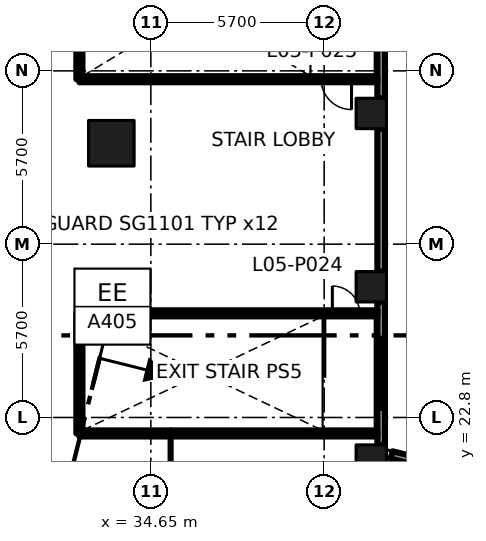
"""IFC4 building model, lengths in metres.
Left out: names, types, materials, properties, quantities, classifications, styles, units other than length and angle.
Written with IfcOpenShell. Run it as: python <this file> out.ifc"""

import sys

from ifc_helpers import new_model, si_unit, direction, frame, frame_2d, origin, origin_2d, place, context, subcontext, project, spatial, rectangle, extrude, element, fill, save


model = new_model("IFC4")
c1 = context("Model", 3, precision=1e-05, world=origin(), true_north=direction((0.0, 1.0)))
c2 = subcontext(c1, "Body", "Model", "MODEL_VIEW")
j1 = project(units=[si_unit("LENGTHUNIT", "METRE"), si_unit("PLANEANGLEUNIT", "RADIAN")], contexts=[c1])
p1 = place(None, origin())
s1 = spatial("IfcSite", under=j1, at=p1, CompositionType="ELEMENT")
p2 = place(p1, origin())
s2 = spatial("IfcBuilding", under=s1, at=p2, CompositionType="ELEMENT")
p3 = place(p2, frame((0.0, 0.0, 28.2)))
s3 = spatial("IfcBuildingStorey", under=s2, at=p3, CompositionType="ELEMENT", Elevation=28.2)
for number, where, z_axis, x_axis in (
    (1, (33.35, 26.119, 0.0), (0.0, 0.0, 1.0), (1.0, 0.0, 0.0)),
    (2, (33.35, 31.819, 0.0), (0.0, 0.0, 1.0), (1.0, 0.0, 0.0)),
):
    element("IfcColumn", number, at=place(p3, frame(where, z_axis=z_axis, x_axis=x_axis)), inside=s3, PredefinedType="COLUMN", context=c2, shape_type="SweptSolid", body=[
        extrude(rectangle(XDim=1.5, YDim=1.5, at=origin_2d()), origin(), (0.0, 0.0, 1.0), 4.8),
    ])
for number, where, z_axis, x_axis in (
    (3, (41.9, 21.399, 0.0), (0.0, 0.0, 1.0), (1.0, 0.0, 0.0)),
    (4, (41.9, 27.099, 0.0), (0.0, 0.0, 1.0), (1.0, 0.0, 0.0)),
    (5, (41.9, 32.799, 0.0), (0.0, 0.0, 1.0), (1.0, 0.0, 0.0)),
):
    element("IfcColumn", number, at=place(p3, frame(where, z_axis=z_axis, x_axis=x_axis)), inside=s3, PredefinedType="COLUMN", context=c2, shape_type="SweptSolid", body=[
        extrude(rectangle(XDim=1.0, YDim=1.0, at=origin_2d()), origin(), (0.0, 0.0, 1.0), 4.8),
    ])
p4 = place(p3, frame((32.3, 22.275, 0.0), z_axis=(0.0, 0.0, 1.0), x_axis=(0.0, 1.0, 0.0)))
e6 = element("IfcWall", 6, at=p4, inside=s3, PredefinedType="SOLIDWALL", context=c2, shape_type="SweptSolid", body=[
    extrude(rectangle(XDim=3.95, YDim=0.2, at=frame_2d((1.975, 0.0))), origin(), (0.0, 0.0, 1.0), 4.35),
])
p5 = place(p3, frame((32.3, 33.925, 0.0), z_axis=(0.0, 0.0, 1.0), x_axis=(0.0, 1.0, 0.0)))
e7 = element("IfcWall", 7, at=p5, inside=s3, PredefinedType="SOLIDWALL", context=c2, shape_type="SweptSolid", body=[
    extrude(rectangle(XDim=4.75, YDim=0.2, at=frame_2d((2.375, 0.0))), origin(), (0.0, 0.0, 1.0), 4.35),
])
p6 = place(p3, frame((34.12, 26.225, 0.0), z_axis=(0.0, 0.0, 1.0), x_axis=(1.0, 0.0, 0.0)))
e8 = element("IfcWall", 8, at=p6, inside=s3, PredefinedType="SOLIDWALL", context=c2, shape_type="SweptSolid", body=[
    extrude(rectangle(XDim=7.98, YDim=0.2, at=frame_2d((3.99, 0.0))), origin(), (0.0, 0.0, 1.0), 4.35),
])
p7 = place(p6, frame((6.5, 0.0, 0.0)))
e9 = element("IfcOpeningElement", 9, at=p7, cuts=e8, PredefinedType="OPENING", context=c2, shape_type="SweptSolid", body=[
    extrude(rectangle(XDim=0.9, YDim=2.1, at=frame_2d((0.45, 1.05))), frame((0.0, 0.11, 0.0), z_axis=(0.0, -1.0, 0.0), x_axis=(1.0, 0.0, 0.0)), (0.0, 0.0, 1.0), 0.22),
])
p8 = place(p3, frame((35.3, 9.6, 0.0), z_axis=(0.0, 0.0, 1.0), x_axis=(0.0, 1.0, 0.0)))
e10 = element("IfcWall", 10, at=p8, inside=s3, PredefinedType="PARTITIONING", context=c2, shape_type="SweptSolid", body=[
    extrude(rectangle(XDim=12.675, YDim=0.1, at=frame_2d((6.337, 0.0))), origin(), (0.0, 0.0, 1.0), 4.35),
])
p9 = place(p8, frame((1.68, 0.0, 0.0)))
e11 = element("IfcOpeningElement", 11, at=p9, cuts=e10, PredefinedType="OPENING", context=c2, shape_type="SweptSolid", body=[
    extrude(rectangle(XDim=1.8, YDim=2.1, at=frame_2d((0.9, 1.05))), frame((0.0, 0.06, 0.0), z_axis=(0.0, -1.0, 0.0), x_axis=(1.0, 0.0, 0.0)), (0.0, 0.0, 1.0), 0.12),
])
p10 = place(p8, frame((8.18, 0.0, 0.0)))
e12 = element("IfcOpeningElement", 12, at=p10, cuts=e10, PredefinedType="OPENING", context=c2, shape_type="SweptSolid", body=[
    extrude(rectangle(XDim=1.0, YDim=2.1, at=frame_2d((0.5, 1.05))), frame((0.0, 0.06, 0.0), z_axis=(0.0, -1.0, 0.0), x_axis=(1.0, 0.0, 0.0)), (0.0, 0.0, 1.0), 0.12),
])
p11 = place(p3, frame((35.3, 22.275, 0.0), z_axis=(0.0, 0.0, 1.0), x_axis=(-1.0, 0.0, 0.0)))
e13 = element("IfcWall", 13, at=p11, inside=s3, PredefinedType="SOLIDWALL", context=c2, shape_type="SweptSolid", body=[
    extrude(rectangle(XDim=3.0, YDim=0.2, at=frame_2d((1.5, 0.0))), origin(), (0.0, 0.0, 1.0), 4.35),
])
p12 = place(p3, frame((42.1, 33.925, 0.0), z_axis=(0.0, 0.0, 1.0), x_axis=(-1.0, 0.0, 0.0)))
e14 = element("IfcWall", 14, at=p12, inside=s3, PredefinedType="SOLIDWALL", context=c2, shape_type="SweptSolid", body=[
    extrude(rectangle(XDim=9.8, YDim=0.2, at=frame_2d((4.9, 0.0))), origin(), (0.0, 0.0, 1.0), 4.35),
])
p13 = place(p12, frame((0.85, 0.0, 0.0)))
e15 = element("IfcOpeningElement", 15, at=p13, cuts=e14, PredefinedType="OPENING", context=c2, shape_type="SweptSolid", body=[
    extrude(rectangle(XDim=1.0, YDim=2.1, at=frame_2d((0.5, 1.05))), frame((0.0, 0.11, 0.0), z_axis=(0.0, -1.0, 0.0), x_axis=(1.0, 0.0, 0.0)), (0.0, 0.0, 1.0), 0.22),
])
p14 = place(p3, frame((35.3, 22.275, 0.0), z_axis=(0.0, 0.0, 1.0), x_axis=(1.0, 0.0, 0.0)))
e16 = element("IfcWall", 16, at=p14, inside=s3, PredefinedType="SOLIDWALL", context=c2, shape_type="SweptSolid", body=[
    extrude(rectangle(XDim=6.8, YDim=0.2, at=frame_2d((3.4, 0.0))), origin(), (0.0, 0.0, 1.0), 4.35),
])
p15 = place(p3, frame((46.922, 20.482, 0.0), z_axis=(0.0, 0.0, 1.0), x_axis=(-0.970279921141, 0.241985277715, 0.0)))
e17 = element("IfcWall", 17, at=p15, inside=s3, PredefinedType="SOLIDWALL", context=c2, shape_type="SweptSolid", body=[
    extrude(rectangle(XDim=4.489, YDim=0.25, at=frame_2d((2.244, 0.0))), origin(), (0.0, 0.0, 1.0), 3.45),
])
p16 = place(p15, frame((1.397, 0.0, 0.9)))
e18 = element("IfcOpeningElement", 18, at=p16, cuts=e17, PredefinedType="OPENING", context=c2, shape_type="SweptSolid", body=[
    extrude(rectangle(XDim=2.4, YDim=2.1, at=frame_2d((1.2, 1.05))), frame((0.0, 0.135, 0.0), z_axis=(0.0, -1.0, 0.0), x_axis=(1.0, 0.0, 0.0)), (0.0, 0.0, 1.0), 0.27),
])
p17 = place(p3, frame((42.225, 21.899, 0.0), z_axis=(0.0, 0.0, 1.0), x_axis=(0.0, 1.0, 0.0)))
e19 = element("IfcWall", 19, at=p17, inside=s3, PredefinedType="SOLIDWALL", context=c2, shape_type="SweptSolid", body=[
    extrude(rectangle(XDim=4.7, YDim=0.25, at=frame_2d((2.35, 0.0))), origin(), (0.0, 0.0, 1.0), 3.45),
])
p18 = place(p17, frame((1.15, 0.0, 0.9)))
e20 = element("IfcOpeningElement", 20, at=p18, cuts=e19, PredefinedType="OPENING", context=c2, shape_type="SweptSolid", body=[
    extrude(rectangle(XDim=2.4, YDim=2.1, at=frame_2d((1.2, 1.05))), frame((0.0, 0.135, 0.0), z_axis=(0.0, -1.0, 0.0), x_axis=(1.0, 0.0, 0.0)), (0.0, 0.0, 1.0), 0.27),
])
p19 = place(p3, frame((42.225, 27.599, 0.0), z_axis=(0.0, 0.0, 1.0), x_axis=(0.0, 1.0, 0.0)))
e21 = element("IfcWall", 21, at=p19, inside=s3, PredefinedType="SOLIDWALL", context=c2, shape_type="SweptSolid", body=[
    extrude(rectangle(XDim=4.7, YDim=0.25, at=frame_2d((2.35, 0.0))), origin(), (0.0, 0.0, 1.0), 3.45),
])
p20 = place(p3, frame((42.225, 33.299, 0.0), z_axis=(0.0, 0.0, 1.0), x_axis=(0.0, 1.0, 0.0)))
e22 = element("IfcWall", 22, at=p20, inside=s3, PredefinedType="SOLIDWALL", context=c2, shape_type="SweptSolid", body=[
    extrude(rectangle(XDim=6.037, YDim=0.25, at=frame_2d((3.019, 0.0))), origin(), (0.0, 0.0, 1.0), 3.45),
])
p21 = place(p20, frame((1.819, 0.0, 0.9)))
e23 = element("IfcOpeningElement", 23, at=p21, cuts=e22, PredefinedType="OPENING", context=c2, shape_type="SweptSolid", body=[
    extrude(rectangle(XDim=2.4, YDim=2.1, at=frame_2d((1.2, 1.05))), frame((0.0, 0.135, 0.0), z_axis=(0.0, -1.0, 0.0), x_axis=(1.0, 0.0, 0.0)), (0.0, 0.0, 1.0), 0.27),
])
p22 = place(p7, origin())
e24 = element("IfcDoor", 24, at=p22, inside=s3, OperationType="SINGLE_SWING_LEFT", PredefinedType="DOOR", context=c2, shape_type="SweptSolid", body=[
    extrude(rectangle(XDim=0.9, YDim=2.1, at=frame_2d((0.45, 1.05))), frame((0.0, 0.025, 0.0), z_axis=(0.0, -1.0, 0.0), x_axis=(1.0, 0.0, 0.0)), (0.0, 0.0, 1.0), 0.05),
])
fill(e9, e24)
p23 = place(p13, origin())
e25 = element("IfcDoor", 25, at=p23, inside=s3, OperationType="SINGLE_SWING_LEFT", PredefinedType="DOOR", context=c2, shape_type="SweptSolid", body=[
    extrude(rectangle(XDim=1.0, YDim=2.1, at=frame_2d((0.5, 1.05))), frame((0.0, 0.025, 0.0), z_axis=(0.0, -1.0, 0.0), x_axis=(1.0, 0.0, 0.0)), (0.0, 0.0, 1.0), 0.05),
])
fill(e15, e25)
p24 = place(p18, origin())
e26 = element("IfcWindow", 26, at=p24, inside=s3, PartitioningType="DOUBLE_PANEL_VERTICAL", PredefinedType="WINDOW", context=c2, shape_type="SweptSolid", body=[
    extrude(rectangle(XDim=2.4, YDim=2.1, at=frame_2d((1.2, 1.05))), frame((0.0, 0.03, 0.0), z_axis=(0.0, -1.0, 0.0), x_axis=(1.0, 0.0, 0.0)), (0.0, 0.0, 1.0), 0.06),
])
fill(e20, e26)
save(model, sys.argv[1])
